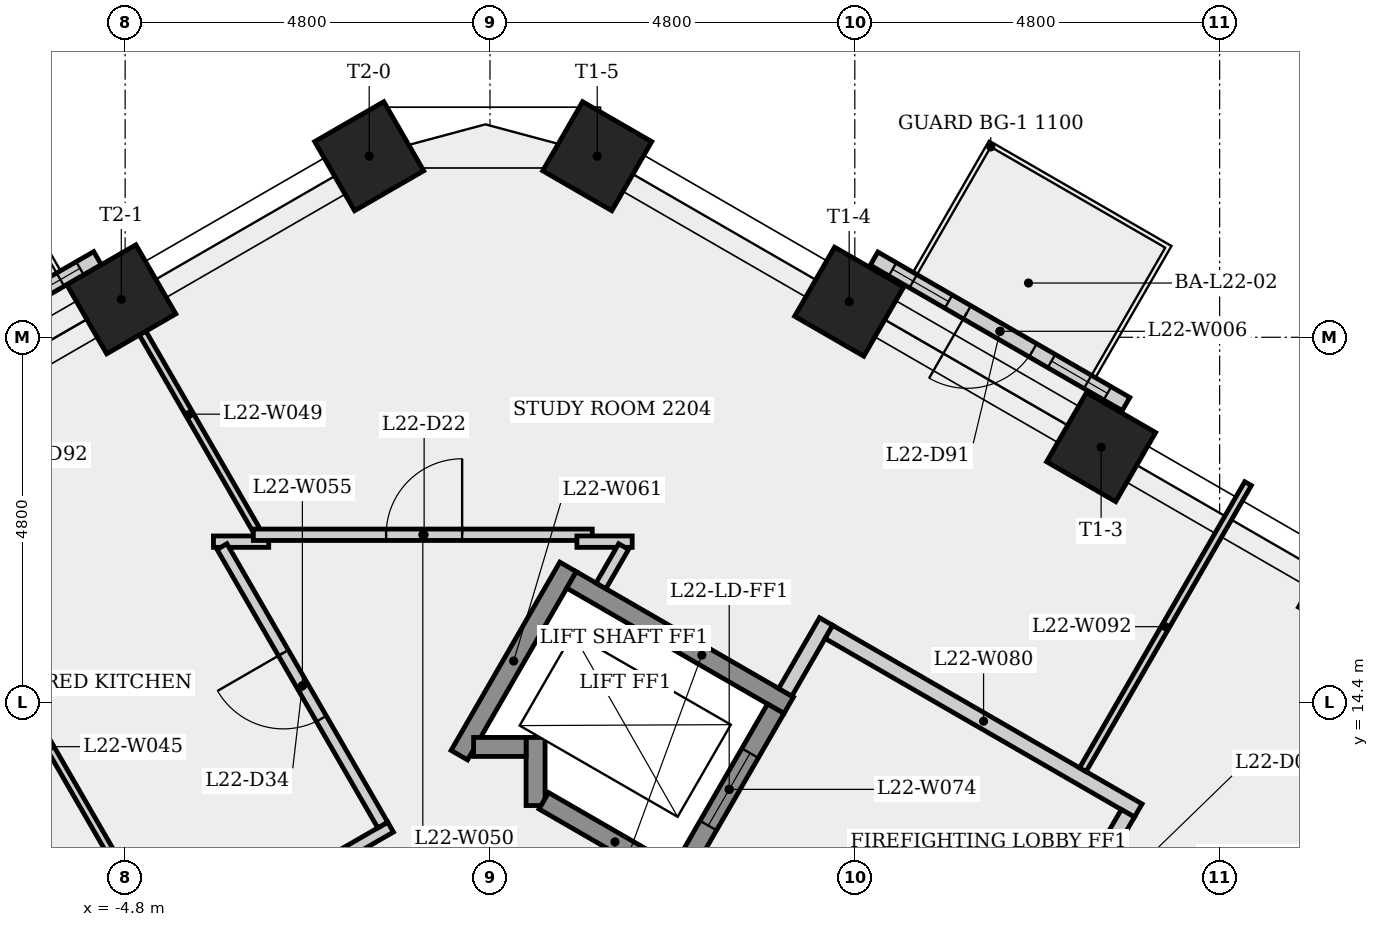
"""IFC4 building model, lengths in metres.
Left out: names, types, materials, properties, quantities, classifications, styles, units other than length and angle.
Written with IfcOpenShell. Run it as: python <this file> out.ifc"""

import sys

from ifc_helpers import new_model, si_unit, direction, frame, frame_2d, origin, origin_2d, place, context, subcontext, project, spatial, rectangle, extrude, element, fill, save


model = new_model("IFC4")
c1 = context("Model", 3, precision=1e-05, world=origin(), true_north=direction((0.0, 1.0)))
c2 = subcontext(c1, "Body", "Model", "MODEL_VIEW")
j1 = project(units=[si_unit("LENGTHUNIT", "METRE"), si_unit("PLANEANGLEUNIT", "RADIAN")], contexts=[c1])
p1 = place(None, origin())
s1 = spatial("IfcSite", under=j1, at=p1, CompositionType="ELEMENT")
p2 = place(p1, origin())
s2 = spatial("IfcBuilding", under=s1, at=p2, CompositionType="ELEMENT")
p3 = place(p2, frame((0.0, 0.0, 86.5)))
s3 = spatial("IfcBuildingStorey", under=s2, at=p3, CompositionType="ELEMENT", Elevation=86.5)
for number, where, z_axis, x_axis in (
    (1, (11.356, 15.841, 0.0), (0.0, 0.0, 1.0), (0.5, 0.866, 0.0)),
    (2, (8.041, 17.755, 0.0), (0.0, 0.0, 1.0), (0.5, 0.866, 0.0)),
    (3, (4.726, 19.669, 0.0), (0.0, 0.0, 1.0), (0.5, 0.866, 0.0)),
    (4, (1.411, 21.583, 0.0), (0.0, 0.0, 1.0), (0.5, 0.866, 0.0)),
    (5, (-1.589, 21.583, 0.0), (0.0, 0.0, 1.0), (-0.5, 0.866, 0.0)),
    (6, (-4.851, 19.699, 0.0), (0.0, 0.0, 1.0), (-0.5, 0.866, 0.0)),
):
    element("IfcColumn", number, at=place(p3, frame(where, z_axis=z_axis, x_axis=x_axis)), inside=s3, PredefinedType="COLUMN", context=c2, shape_type="SweptSolid", body=[
        extrude(rectangle(XDim=1.05, YDim=1.05, at=origin_2d()), origin(), (0.0, 0.0, 1.0), 3.4),
    ])
p4 = place(p3, frame((-5.163, 20.241, 0.0), z_axis=(0.0, 0.0, 1.0), x_axis=(-0.866020414047, -0.500008642379, 0.0)))
e7 = element("IfcWall", 7, at=p4, inside=s3, PredefinedType="SOLIDWALL", context=c2, shape_type="SweptSolid", body=[
    extrude(rectangle(XDim=3.766, YDim=0.2, at=frame_2d((1.883, 0.0))), origin(), (0.0, 0.0, 1.0), 3.4),
])
p5 = place(p4, frame((1.383, 0.0, 0.0)))
e8 = element("IfcOpeningElement", 8, at=p5, cuts=e7, PredefinedType="OPENING", context=c2, shape_type="SweptSolid", body=[
    extrude(rectangle(XDim=1.0, YDim=2.4, at=frame_2d((0.5, 1.2))), frame((0.0, 0.11, 0.0), z_axis=(0.0, -1.0, 0.0), x_axis=(1.0, 0.0, 0.0)), (0.0, 0.0, 1.0), 0.22),
])
p6 = place(p4, frame((0.267, 0.0, 0.9)))
e9 = element("IfcOpeningElement", 9, at=p6, cuts=e7, PredefinedType="OPENING", context=c2, shape_type="SweptSolid", body=[
    extrude(rectangle(XDim=0.85, YDim=1.5, at=frame_2d((0.425, 0.75))), frame((0.0, 0.11, 0.0), z_axis=(0.0, -1.0, 0.0), x_axis=(1.0, 0.0, 0.0)), (0.0, 0.0, 1.0), 0.22),
])
p7 = place(p4, frame((2.649, 0.0, 0.9)))
e10 = element("IfcOpeningElement", 10, at=p7, cuts=e7, PredefinedType="OPENING", context=c2, shape_type="SweptSolid", body=[
    extrude(rectangle(XDim=0.85, YDim=1.5, at=frame_2d((0.425, 0.75))), frame((0.0, 0.11, 0.0), z_axis=(0.0, -1.0, 0.0), x_axis=(1.0, 0.0, 0.0)), (0.0, 0.0, 1.0), 0.22),
])
p8 = place(p3, frame((8.368, 18.322, 0.0), z_axis=(0.0, 0.0, 1.0), x_axis=(-0.866020966001, 0.500007686387, 0.0)))
e11 = element("IfcWall", 11, at=p8, inside=s3, PredefinedType="SOLIDWALL", context=c2, shape_type="SweptSolid", body=[
    extrude(rectangle(XDim=3.828, YDim=0.2, at=frame_2d((1.914, 0.0))), origin(), (0.0, 0.0, 1.0), 3.4),
])
p9 = place(p8, frame((1.414, 0.0, 0.0)))
e12 = element("IfcOpeningElement", 12, at=p9, cuts=e11, PredefinedType="OPENING", context=c2, shape_type="SweptSolid", body=[
    extrude(rectangle(XDim=1.0, YDim=2.4, at=frame_2d((0.5, 1.2))), frame((0.0, 0.11, 0.0), z_axis=(0.0, -1.0, 0.0), x_axis=(1.0, 0.0, 0.0)), (0.0, 0.0, 1.0), 0.22),
])
p10 = place(p8, frame((0.282, 0.0, 0.9)))
e13 = element("IfcOpeningElement", 13, at=p10, cuts=e11, PredefinedType="OPENING", context=c2, shape_type="SweptSolid", body=[
    extrude(rectangle(XDim=0.85, YDim=1.5, at=frame_2d((0.425, 0.75))), frame((0.0, 0.11, 0.0), z_axis=(0.0, -1.0, 0.0), x_axis=(1.0, 0.0, 0.0)), (0.0, 0.0, 1.0), 0.22),
])
p11 = place(p8, frame((2.696, 0.0, 0.9)))
e14 = element("IfcOpeningElement", 14, at=p11, cuts=e11, PredefinedType="OPENING", context=c2, shape_type="SweptSolid", body=[
    extrude(rectangle(XDim=0.85, YDim=1.5, at=frame_2d((0.425, 0.75))), frame((0.0, 0.11, 0.0), z_axis=(0.0, -1.0, 0.0), x_axis=(1.0, 0.0, 0.0)), (0.0, 0.0, 1.0), 0.22),
])
p12 = place(p3, frame((-10.695, 7.335, 0.0), z_axis=(0.0, 0.0, 1.0), x_axis=(0.866020922188, 0.500007762273, 0.0)))
e15 = element("IfcWall", 15, at=p12, inside=s3, PredefinedType="PARTITIONING", context=c2, shape_type="SweptSolid", body=[
    extrude(rectangle(XDim=10.839, YDim=0.15, at=frame_2d((5.419, 0.0))), origin(), (0.0, 0.0, 1.0), 3.05),
])
p13 = place(p12, frame((5.699, 0.0, 0.0)))
e16 = element("IfcOpeningElement", 16, at=p13, cuts=e15, PredefinedType="OPENING", context=c2, shape_type="SweptSolid", body=[
    extrude(rectangle(XDim=1.0, YDim=2.1, at=frame_2d((0.5, 1.05))), frame((0.0, 0.085, 0.0), z_axis=(0.0, -1.0, 0.0), x_axis=(1.0, 0.0, 0.0)), (0.0, 0.0, 1.0), 0.17),
])
p14 = place(p3, frame((-4.251, 11.142, 0.0), z_axis=(0.0, 0.0, 1.0), x_axis=(-0.500021201058, 0.866013163002, 0.0)))
e17 = element("IfcWall", 17, at=p14, inside=s3, PredefinedType="PARTITIONING", context=c2, shape_type="SweptSolid", body=[
    extrude(rectangle(XDim=7.711, YDim=0.1, at=frame_2d((3.855, 0.0))), origin(), (0.0, 0.0, 1.0), 3.05),
])
p15 = place(p3, frame((-3.638, 16.511, 0.0), z_axis=(0.0, 0.0, 1.0), x_axis=(1.0, 0.0, 0.0)))
e18 = element("IfcWall", 18, at=p15, inside=s3, PredefinedType="PARTITIONING", context=c2, shape_type="SweptSolid", body=[
    extrude(rectangle(XDim=0.727, YDim=0.15, at=frame_2d((0.364, 0.0))), origin(), (0.0, 0.0, 1.0), 3.05),
])
p16 = place(p3, frame((-3.076, 16.667, 0.0), z_axis=(0.0, 0.0, 1.0), x_axis=(-0.500017137554, 0.866015509187, 0.0)))
e19 = element("IfcWall", 19, at=p16, inside=s3, PredefinedType="PARTITIONING", context=c2, shape_type="SweptSolid", body=[
    extrude(rectangle(XDim=3.514, YDim=0.1, at=frame_2d((1.757, 0.0))), origin(), (0.0, 0.0, 1.0), 3.05),
])
p17 = place(p3, frame((-3.113, 16.602, 0.0), z_axis=(0.0, 0.0, 1.0), x_axis=(1.0, 0.0, 0.0)))
e20 = element("IfcWall", 20, at=p17, inside=s3, PredefinedType="PARTITIONING", context=c2, shape_type="SweptSolid", body=[
    extrude(rectangle(XDim=4.459, YDim=0.15, at=frame_2d((2.23, 0.0))), origin(), (0.0, 0.0, 1.0), 3.05),
])
p18 = place(p17, frame((1.747, 0.0, 0.0)))
e21 = element("IfcOpeningElement", 21, at=p18, cuts=e20, PredefinedType="OPENING", context=c2, shape_type="SweptSolid", body=[
    extrude(rectangle(XDim=1.0, YDim=2.1, at=frame_2d((0.5, 1.05))), frame((0.0, 0.085, 0.0), z_axis=(0.0, -1.0, 0.0), x_axis=(1.0, 0.0, 0.0)), (0.0, 0.0, 1.0), 0.17),
])
p19 = place(p3, frame((-1.41, 12.782, 0.0), z_axis=(0.0, 0.0, 1.0), x_axis=(-0.499987210724, 0.86603278755, 0.0)))
e22 = element("IfcWall", 22, at=p19, inside=s3, PredefinedType="PARTITIONING", context=c2, shape_type="SweptSolid", body=[
    extrude(rectangle(XDim=4.23, YDim=0.15, at=frame_2d((2.115, 0.0))), origin(), (0.0, 0.0, 1.0), 3.05),
])
p20 = place(p19, frame((1.615, 0.0, 0.0)))
e23 = element("IfcOpeningElement", 23, at=p20, cuts=e22, PredefinedType="OPENING", context=c2, shape_type="SweptSolid", body=[
    extrude(rectangle(XDim=1.0, YDim=2.1, at=frame_2d((0.5, 1.05))), frame((0.0, 0.085, 0.0), z_axis=(0.0, -1.0, 0.0), x_axis=(1.0, 0.0, 0.0)), (0.0, 0.0, 1.0), 0.17),
])
p21 = place(p3, frame((-0.403, 13.702, 0.0), z_axis=(0.0, 0.0, 1.0), x_axis=(0.499976111731, 0.866039195244, 0.0)))
e24 = element("IfcWall", 24, at=p21, inside=s3, PredefinedType="SHEAR", context=c2, shape_type="SweptSolid", body=[
    extrude(rectangle(XDim=2.861, YDim=0.25, at=frame_2d((1.43, 0.0))), origin(), (0.0, 0.0, 1.0), 3.05),
])
p22 = place(p3, frame((0.6, 13.039, 0.0), z_axis=(0.0, 0.0, 1.0), x_axis=(0.0, 1.0, 0.0)))
e25 = element("IfcWall", 25, at=p22, inside=s3, PredefinedType="SHEAR", context=c2, shape_type="SweptSolid", body=[
    extrude(rectangle(XDim=0.896, YDim=0.25, at=frame_2d((0.448, 0.0))), origin(), (0.0, 0.0, 1.0), 3.05),
])
p23 = place(p3, frame((0.475, 13.81, 0.0), z_axis=(0.0, 0.0, 1.0), x_axis=(-1.0, 0.0, 0.0)))
e26 = element("IfcWall", 26, at=p23, inside=s3, PredefinedType="SHEAR", context=c2, shape_type="SweptSolid", body=[
    extrude(rectangle(XDim=0.691, YDim=0.25, at=frame_2d((0.345, 0.0))), origin(), (0.0, 0.0, 1.0), 3.4),
])
p24 = place(p3, frame((1.073, 16.008, 0.0), z_axis=(0.0, 0.0, 1.0), x_axis=(0.866040211805, -0.499974350878, 0.0)))
e27 = element("IfcWall", 27, at=p24, inside=s3, PredefinedType="SHEAR", context=c2, shape_type="SweptSolid", body=[
    extrude(rectangle(XDim=3.3, YDim=0.25, at=frame_2d((1.65, 0.0))), origin(), (0.0, 0.0, 1.0), 3.05),
])
p25 = place(p3, frame((1.144, 16.511, 0.0), z_axis=(0.0, 0.0, 1.0), x_axis=(1.0, 0.0, 0.0)))
e28 = element("IfcWall", 28, at=p25, inside=s3, PredefinedType="PARTITIONING", context=c2, shape_type="SweptSolid", body=[
    extrude(rectangle(XDim=0.727, YDim=0.15, at=frame_2d((0.364, 0.0))), origin(), (0.0, 0.0, 1.0), 3.05),
])
p26 = place(p3, frame((1.759, 16.446, 0.0), z_axis=(0.0, 0.0, 1.0), x_axis=(-0.499746055734, -0.86617196894, 0.0)))
e29 = element("IfcWall", 29, at=p26, inside=s3, PredefinedType="PARTITIONING", context=c2, shape_type="SweptSolid", body=[
    extrude(rectangle(XDim=0.597, YDim=0.15, at=frame_2d((0.298, 0.0))), origin(), (0.0, 0.0, 1.0), 3.05),
])
p27 = place(p3, frame((2.581, 12.02, 0.0), z_axis=(0.0, 0.0, 1.0), x_axis=(-0.86603892542, 0.499976579108, 0.0)))
e30 = element("IfcWall", 30, at=p27, inside=s3, PredefinedType="SHEAR", context=c2, shape_type="SweptSolid", body=[
    extrude(rectangle(XDim=2.162, YDim=0.25, at=frame_2d((1.081, 0.0))), origin(), (0.0, 0.0, 1.0), 3.05),
])
p28 = place(p3, frame((2.535, 12.191, 0.0), z_axis=(0.0, 0.0, 1.0), x_axis=(0.500061746146, 0.865989751695, 0.0)))
e31 = element("IfcWall", 31, at=p28, inside=s3, PredefinedType="SHEAR", context=c2, shape_type="SweptSolid", body=[
    extrude(rectangle(XDim=2.45, YDim=0.25, at=frame_2d((1.225, 0.0))), origin(), (0.0, 0.0, 1.0), 3.4),
])
p29 = place(p28, frame((0.675, 0.0, 0.0)))
e32 = element("IfcOpeningElement", 32, at=p29, cuts=e31, PredefinedType="OPENING", context=c2, shape_type="SweptSolid", body=[
    extrude(rectangle(XDim=1.1, YDim=2.1, at=frame_2d((0.55, 1.05))), frame((0.0, 0.135, 0.0), z_axis=(0.0, -1.0, 0.0), x_axis=(1.0, 0.0, 0.0)), (0.0, 0.0, 1.0), 0.27),
])
p30 = place(p3, frame((3.885, 14.529, 0.0), z_axis=(0.0, 0.0, 1.0), x_axis=(0.499997628298, 0.866026773083, 0.0)))
e33 = element("IfcWall", 33, at=p30, inside=s3, PredefinedType="PARTITIONING", context=c2, shape_type="SweptSolid", body=[
    extrude(rectangle(XDim=1.075, YDim=0.2, at=frame_2d((0.538, 0.0))), origin(), (0.0, 0.0, 1.0), 3.05),
])
p31 = place(p3, frame((4.459, 15.323, 0.0), z_axis=(0.0, 0.0, 1.0), x_axis=(0.866016039709, -0.500016218704, 0.0)))
e34 = element("IfcWall", 34, at=p31, inside=s3, PredefinedType="PARTITIONING", context=c2, shape_type="SweptSolid", body=[
    extrude(rectangle(XDim=4.7, YDim=0.2, at=frame_2d((2.35, 0.0))), origin(), (0.0, 0.0, 1.0), 3.05),
])
p32 = place(p3, frame((6.48, 9.624, 0.0), z_axis=(0.0, 0.0, 1.0), x_axis=(0.500017246033, 0.866015446554, 0.0)))
e35 = element("IfcWall", 35, at=p32, inside=s3, PredefinedType="SHEAR", context=c2, shape_type="SweptSolid", body=[
    extrude(rectangle(XDim=3.25, YDim=0.25, at=frame_2d((1.625, 0.0))), origin(), (0.0, 0.0, 1.0), 3.05),
])
p33 = place(p32, frame((1.125, 0.0, 0.0)))
e36 = element("IfcOpeningElement", 36, at=p33, cuts=e35, PredefinedType="OPENING", context=c2, shape_type="SweptSolid", body=[
    extrude(rectangle(XDim=1.0, YDim=2.1, at=frame_2d((0.5, 1.05))), frame((0.0, 0.135, 0.0), z_axis=(0.0, -1.0, 0.0), x_axis=(1.0, 0.0, 0.0)), (0.0, 0.0, 1.0), 0.27),
])
p34 = place(p3, frame((7.8, 13.51, 0.0), z_axis=(0.0, 0.0, 1.0), x_axis=(0.499986584829, 0.866033148899, 0.0)))
e37 = element("IfcWall", 37, at=p34, inside=s3, PredefinedType="PARTITIONING", context=c2, shape_type="SweptSolid", body=[
    extrude(rectangle(XDim=4.347, YDim=0.1, at=frame_2d((2.174, 0.0))), origin(), (0.0, 0.0, 1.0), 3.05),
])
p35 = place(p3, frame((8.393, 12.937, 0.0), z_axis=(0.0, 0.0, 1.0), x_axis=(-0.500065409566, -0.86598763626, 0.0)))
e38 = element("IfcWall", 38, at=p35, inside=s3, PredefinedType="PARTITIONING", context=c2, shape_type="SweptSolid", body=[
    extrude(rectangle(XDim=0.575, YDim=0.2, at=frame_2d((0.288, 0.0))), origin(), (0.0, 0.0, 1.0), 3.05),
])
p36 = place(p6, origin())
e39 = element("IfcWindow", 39, at=p36, inside=s3, PartitioningType="SINGLE_PANEL", PredefinedType="WINDOW", context=c2, shape_type="SweptSolid", body=[
    extrude(rectangle(XDim=0.85, YDim=1.5, at=frame_2d((0.425, 0.75))), frame((0.0, 0.03, 0.0), z_axis=(0.0, -1.0, 0.0), x_axis=(1.0, 0.0, 0.0)), (0.0, 0.0, 1.0), 0.06),
])
fill(e9, e39)
p37 = place(p9, origin())
e40 = element("IfcDoor", 40, at=p37, inside=s3, OperationType="SINGLE_SWING_RIGHT", PredefinedType="DOOR", context=c2, shape_type="SweptSolid", body=[
    extrude(rectangle(XDim=1.0, YDim=2.4, at=frame_2d((0.5, 1.2))), frame((0.0, 0.025, 0.0), z_axis=(0.0, -1.0, 0.0), x_axis=(1.0, 0.0, 0.0)), (0.0, 0.0, 1.0), 0.05),
])
fill(e12, e40)
p38 = place(p10, origin())
e41 = element("IfcWindow", 41, at=p38, inside=s3, PartitioningType="SINGLE_PANEL", PredefinedType="WINDOW", context=c2, shape_type="SweptSolid", body=[
    extrude(rectangle(XDim=0.85, YDim=1.5, at=frame_2d((0.425, 0.75))), frame((0.0, 0.03, 0.0), z_axis=(0.0, -1.0, 0.0), x_axis=(1.0, 0.0, 0.0)), (0.0, 0.0, 1.0), 0.06),
])
fill(e13, e41)
p39 = place(p11, origin())
e42 = element("IfcWindow", 42, at=p39, inside=s3, PartitioningType="SINGLE_PANEL", PredefinedType="WINDOW", context=c2, shape_type="SweptSolid", body=[
    extrude(rectangle(XDim=0.85, YDim=1.5, at=frame_2d((0.425, 0.75))), frame((0.0, 0.03, 0.0), z_axis=(0.0, -1.0, 0.0), x_axis=(1.0, 0.0, 0.0)), (0.0, 0.0, 1.0), 0.06),
])
fill(e14, e42)
p40 = place(p29, origin())
e43 = element("IfcDoor", 43, at=p40, inside=s3, OperationType="SLIDING_TO_LEFT", PredefinedType="DOOR", context=c2, shape_type="SweptSolid", body=[
    extrude(rectangle(XDim=1.1, YDim=2.1, at=frame_2d((0.55, 1.05))), frame((0.0, 0.025, 0.0), z_axis=(0.0, -1.0, 0.0), x_axis=(1.0, 0.0, 0.0)), (0.0, 0.0, 1.0), 0.05),
])
fill(e32, e43)
p41 = place(p18, origin())
e44 = element("IfcDoor", 44, at=p41, inside=s3, OperationType="SINGLE_SWING_RIGHT", PredefinedType="DOOR", context=c2, shape_type="SweptSolid", body=[
    extrude(rectangle(XDim=1.0, YDim=2.1, at=frame_2d((0.5, 1.05))), frame((0.0, 0.025, 0.0), z_axis=(0.0, -1.0, 0.0), x_axis=(1.0, 0.0, 0.0)), (0.0, 0.0, 1.0), 0.05),
])
fill(e21, e44)
p42 = place(p20, origin())
e45 = element("IfcDoor", 45, at=p42, inside=s3, OperationType="SINGLE_SWING_RIGHT", PredefinedType="DOOR", context=c2, shape_type="SweptSolid", body=[
    extrude(rectangle(XDim=1.0, YDim=2.1, at=frame_2d((0.5, 1.05))), frame((0.0, 0.025, 0.0), z_axis=(0.0, -1.0, 0.0), x_axis=(1.0, 0.0, 0.0)), (0.0, 0.0, 1.0), 0.05),
])
fill(e23, e45)
save(model, sys.argv[1])
